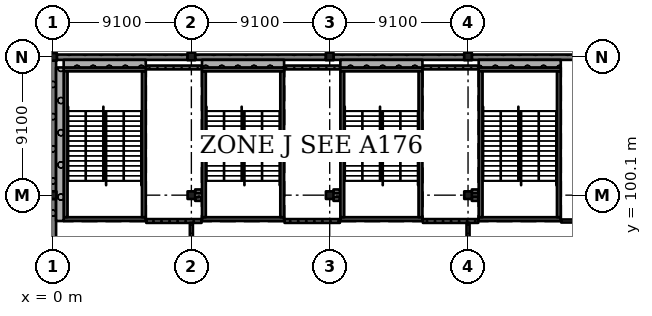
"""IFC4 building model, lengths in metres.
Left out: names, types, materials, properties, quantities, classifications, styles, units other than length and angle.
Written with IfcOpenShell. Run it as: python <this file> out.ifc"""

import sys

from ifc_helpers import new_model, si_unit, direction, frame, frame_2d, origin, origin_2d, place, context, subcontext, project, spatial, rectangle, extrude, element, fill, save


model = new_model("IFC4")
c1 = context("Model", 3, precision=1e-05, world=origin(), true_north=direction((0.0, 1.0)))
c2 = subcontext(c1, "Body", "Model", "MODEL_VIEW")
j1 = project(units=[si_unit("LENGTHUNIT", "METRE"), si_unit("PLANEANGLEUNIT", "RADIAN")], contexts=[c1])
p1 = place(None, origin())
s1 = spatial("IfcSite", under=j1, at=p1, CompositionType="ELEMENT")
p2 = place(p1, origin())
s2 = spatial("IfcBuilding", under=s1, at=p2, CompositionType="ELEMENT")
p3 = place(p2, frame((0.0, 0.0, 24.57)))
s3 = spatial("IfcBuildingStorey", under=s2, at=p3, CompositionType="ELEMENT", Elevation=24.57)
for number, where, z_axis, x_axis in (
    (1, (-0.025, 100.1, 0.0), (0.0, 0.0, 1.0), (1.0, 0.0, 0.0)),
    (2, (0.0, 109.2, 0.0), (0.0, 0.0, 1.0), (1.0, 0.0, 0.0)),
    (3, (9.1, 100.1, 0.0), (0.0, 0.0, 1.0), (1.0, 0.0, 0.0)),
    (4, (9.1, 109.225, 0.0), (0.0, 0.0, 1.0), (1.0, 0.0, 0.0)),
    (5, (18.2, 100.1, 0.0), (0.0, 0.0, 1.0), (1.0, 0.0, 0.0)),
    (6, (18.2, 109.225, 0.0), (0.0, 0.0, 1.0), (1.0, 0.0, 0.0)),
    (7, (27.3, 100.1, 0.0), (0.0, 0.0, 1.0), (1.0, 0.0, 0.0)),
    (8, (27.3, 109.225, 0.0), (0.0, 0.0, 1.0), (1.0, 0.0, 0.0)),
):
    element("IfcColumn", number, at=place(p3, frame(where, z_axis=z_axis, x_axis=x_axis)), inside=s3, PredefinedType="COLUMN", context=c2, shape_type="SweptSolid", body=[
        extrude(rectangle(XDim=0.5, YDim=0.5, at=origin_2d()), origin(), (0.0, 0.0, 1.0), 4.55),
    ])
p4 = place(p3, frame((6.1, 98.525, 0.0), z_axis=(0.0, 0.0, 1.0), x_axis=(-1.0, 0.0, 0.0)))
e9 = element("IfcWall", 9, at=p4, inside=s3, PredefinedType="SHEAR", context=c2, shape_type="SweptSolid", body=[
    extrude(rectangle(XDim=5.4, YDim=0.25, at=frame_2d((2.7, 0.0))), origin(), (0.0, 0.0, 1.0), 4.55),
])
p5 = place(p4, frame((1.5, 0.0, 0.0)))
e10 = element("IfcOpeningElement", 10, at=p5, cuts=e9, PredefinedType="OPENING", context=c2, shape_type="SweptSolid", body=[
    extrude(rectangle(XDim=2.4, YDim=2.1, at=frame_2d((1.2, 1.05))), frame((0.0, 0.135, 0.0), z_axis=(0.0, -1.0, 0.0), x_axis=(1.0, 0.0, 0.0)), (0.0, 0.0, 1.0), 0.27),
])
p6 = place(p3, frame((6.1, 108.375, 0.0), z_axis=(0.0, 0.0, 1.0), x_axis=(-1.0, 0.0, 0.0)))
e11 = element("IfcWall", 11, at=p6, inside=s3, PredefinedType="SHEAR", context=c2, shape_type="SweptSolid", body=[
    extrude(rectangle(XDim=5.4, YDim=0.25, at=frame_2d((2.7, 0.0))), origin(), (0.0, 0.0, 1.0), 4.55),
])
for number, where, z_axis, x_axis in (
    (12, (0.825, 108.25, 0.0), (0.0, 0.0, 1.0), (0.0, -1.0, 0.0)),
    (13, (5.975, 108.25, 0.0), (0.0, 0.0, 1.0), (0.0, -1.0, 0.0)),
):
    element("IfcWall", number, at=place(p3, frame(where, z_axis=z_axis, x_axis=x_axis)), inside=s3, PredefinedType="SHEAR", context=c2, shape_type="SweptSolid", body=[
        extrude(rectangle(XDim=9.6, YDim=0.25, at=frame_2d((4.8, 0.0))), origin(), (0.0, 0.0, 1.0), 4.55),
    ])
p7 = place(p3, frame((15.2, 98.525, 0.0), z_axis=(0.0, 0.0, 1.0), x_axis=(-1.0, 0.0, 0.0)))
e14 = element("IfcWall", 14, at=p7, inside=s3, PredefinedType="SHEAR", context=c2, shape_type="SweptSolid", body=[
    extrude(rectangle(XDim=5.4, YDim=0.25, at=frame_2d((2.7, 0.0))), origin(), (0.0, 0.0, 1.0), 4.55),
])
p8 = place(p7, frame((1.5, 0.0, 0.0)))
e15 = element("IfcOpeningElement", 15, at=p8, cuts=e14, PredefinedType="OPENING", context=c2, shape_type="SweptSolid", body=[
    extrude(rectangle(XDim=2.4, YDim=2.1, at=frame_2d((1.2, 1.05))), frame((0.0, 0.135, 0.0), z_axis=(0.0, -1.0, 0.0), x_axis=(1.0, 0.0, 0.0)), (0.0, 0.0, 1.0), 0.27),
])
p9 = place(p3, frame((15.2, 108.375, 0.0), z_axis=(0.0, 0.0, 1.0), x_axis=(-1.0, 0.0, 0.0)))
e16 = element("IfcWall", 16, at=p9, inside=s3, PredefinedType="SHEAR", context=c2, shape_type="SweptSolid", body=[
    extrude(rectangle(XDim=5.4, YDim=0.25, at=frame_2d((2.7, 0.0))), origin(), (0.0, 0.0, 1.0), 4.55),
])
for number, where, z_axis, x_axis in (
    (17, (9.925, 108.25, 0.0), (0.0, 0.0, 1.0), (0.0, -1.0, 0.0)),
    (18, (15.075, 108.25, 0.0), (0.0, 0.0, 1.0), (0.0, -1.0, 0.0)),
):
    element("IfcWall", number, at=place(p3, frame(where, z_axis=z_axis, x_axis=x_axis)), inside=s3, PredefinedType="SHEAR", context=c2, shape_type="SweptSolid", body=[
        extrude(rectangle(XDim=9.6, YDim=0.25, at=frame_2d((4.8, 0.0))), origin(), (0.0, 0.0, 1.0), 4.55),
    ])
p10 = place(p3, frame((24.3, 98.525, 0.0), z_axis=(0.0, 0.0, 1.0), x_axis=(-1.0, 0.0, 0.0)))
e19 = element("IfcWall", 19, at=p10, inside=s3, PredefinedType="SHEAR", context=c2, shape_type="SweptSolid", body=[
    extrude(rectangle(XDim=5.4, YDim=0.25, at=frame_2d((2.7, 0.0))), origin(), (0.0, 0.0, 1.0), 4.55),
])
p11 = place(p10, frame((1.5, 0.0, 0.0)))
e20 = element("IfcOpeningElement", 20, at=p11, cuts=e19, PredefinedType="OPENING", context=c2, shape_type="SweptSolid", body=[
    extrude(rectangle(XDim=2.4, YDim=2.1, at=frame_2d((1.2, 1.05))), frame((0.0, 0.135, 0.0), z_axis=(0.0, -1.0, 0.0), x_axis=(1.0, 0.0, 0.0)), (0.0, 0.0, 1.0), 0.27),
])
p12 = place(p3, frame((24.3, 108.375, 0.0), z_axis=(0.0, 0.0, 1.0), x_axis=(-1.0, 0.0, 0.0)))
e21 = element("IfcWall", 21, at=p12, inside=s3, PredefinedType="SHEAR", context=c2, shape_type="SweptSolid", body=[
    extrude(rectangle(XDim=5.4, YDim=0.25, at=frame_2d((2.7, 0.0))), origin(), (0.0, 0.0, 1.0), 4.55),
])
for number, where, z_axis, x_axis in (
    (22, (19.025, 108.25, 0.0), (0.0, 0.0, 1.0), (0.0, -1.0, 0.0)),
    (23, (24.175, 108.25, 0.0), (0.0, 0.0, 1.0), (0.0, -1.0, 0.0)),
):
    element("IfcWall", number, at=place(p3, frame(where, z_axis=z_axis, x_axis=x_axis)), inside=s3, PredefinedType="SHEAR", context=c2, shape_type="SweptSolid", body=[
        extrude(rectangle(XDim=9.6, YDim=0.25, at=frame_2d((4.8, 0.0))), origin(), (0.0, 0.0, 1.0), 4.55),
    ])
p13 = place(p3, frame((33.4, 98.525, 0.0), z_axis=(0.0, 0.0, 1.0), x_axis=(-1.0, 0.0, 0.0)))
e24 = element("IfcWall", 24, at=p13, inside=s3, PredefinedType="SHEAR", context=c2, shape_type="SweptSolid", body=[
    extrude(rectangle(XDim=5.4, YDim=0.25, at=frame_2d((2.7, 0.0))), origin(), (0.0, 0.0, 1.0), 4.55),
])
p14 = place(p13, frame((1.5, 0.0, 0.0)))
e25 = element("IfcOpeningElement", 25, at=p14, cuts=e24, PredefinedType="OPENING", context=c2, shape_type="SweptSolid", body=[
    extrude(rectangle(XDim=2.4, YDim=2.1, at=frame_2d((1.2, 1.05))), frame((0.0, 0.135, 0.0), z_axis=(0.0, -1.0, 0.0), x_axis=(1.0, 0.0, 0.0)), (0.0, 0.0, 1.0), 0.27),
])
p15 = place(p3, frame((33.4, 108.375, 0.0), z_axis=(0.0, 0.0, 1.0), x_axis=(-1.0, 0.0, 0.0)))
e26 = element("IfcWall", 26, at=p15, inside=s3, PredefinedType="SHEAR", context=c2, shape_type="SweptSolid", body=[
    extrude(rectangle(XDim=5.4, YDim=0.25, at=frame_2d((2.7, 0.0))), origin(), (0.0, 0.0, 1.0), 4.55),
])
for number, where, z_axis, x_axis in (
    (27, (28.125, 108.25, 0.0), (0.0, 0.0, 1.0), (0.0, -1.0, 0.0)),
    (28, (33.275, 108.25, 0.0), (0.0, 0.0, 1.0), (0.0, -1.0, 0.0)),
):
    element("IfcWall", number, at=place(p3, frame(where, z_axis=z_axis, x_axis=x_axis)), inside=s3, PredefinedType="SHEAR", context=c2, shape_type="SweptSolid", body=[
        extrude(rectangle(XDim=9.6, YDim=0.25, at=frame_2d((4.8, 0.0))), origin(), (0.0, 0.0, 1.0), 4.55),
    ])
p16 = place(p3, frame((36.15, 109.175, 0.0), z_axis=(0.0, 0.0, 1.0), x_axis=(-1.0, 0.0, 0.0)))
e29 = element("IfcWall", 29, at=p16, inside=s3, PredefinedType="SOLIDWALL", context=c2, shape_type="SweptSolid", body=[
    extrude(rectangle(XDim=8.6, YDim=0.35, at=frame_2d((4.3, 0.0))), origin(), (0.0, 0.0, 1.0), 3.6),
])
p17 = place(p3, frame((27.05, 109.175, 0.0), z_axis=(0.0, 0.0, 1.0), x_axis=(-1.0, 0.0, 0.0)))
e30 = element("IfcWall", 30, at=p17, inside=s3, PredefinedType="SOLIDWALL", context=c2, shape_type="SweptSolid", body=[
    extrude(rectangle(XDim=8.6, YDim=0.35, at=frame_2d((4.3, 0.0))), origin(), (0.0, 0.0, 1.0), 3.6),
])
p18 = place(p3, frame((17.95, 109.175, 0.0), z_axis=(0.0, 0.0, 1.0), x_axis=(-1.0, 0.0, 0.0)))
e31 = element("IfcWall", 31, at=p18, inside=s3, PredefinedType="SOLIDWALL", context=c2, shape_type="SweptSolid", body=[
    extrude(rectangle(XDim=8.6, YDim=0.35, at=frame_2d((4.3, 0.0))), origin(), (0.0, 0.0, 1.0), 3.6),
])
p19 = place(p3, frame((8.85, 109.175, 0.0), z_axis=(0.0, 0.0, 1.0), x_axis=(-1.0, 0.0, 0.0)))
e32 = element("IfcWall", 32, at=p19, inside=s3, PredefinedType="SOLIDWALL", context=c2, shape_type="SweptSolid", body=[
    extrude(rectangle(XDim=8.6, YDim=0.35, at=frame_2d((4.3, 0.0))), origin(), (0.0, 0.0, 1.0), 3.6),
])
p20 = place(p3, frame((0.025, 108.95, 0.0), z_axis=(0.0, 0.0, 1.0), x_axis=(0.0, -1.0, 0.0)))
e33 = element("IfcWall", 33, at=p20, inside=s3, PredefinedType="SOLIDWALL", context=c2, shape_type="SweptSolid", body=[
    extrude(rectangle(XDim=8.6, YDim=0.35, at=frame_2d((4.3, 0.0))), origin(), (0.0, 0.0, 1.0), 3.6),
])
p21 = place(p3, frame((0.025, 99.85, 0.0), z_axis=(0.0, 0.0, 1.0), x_axis=(0.0, -1.0, 0.0)))
e34 = element("IfcWall", 34, at=p21, inside=s3, PredefinedType="SOLIDWALL", context=c2, shape_type="SweptSolid", body=[
    extrude(rectangle(XDim=8.6, YDim=0.35, at=frame_2d((4.3, 0.0))), origin(), (0.0, 0.0, 1.0), 3.6),
])
p22 = place(p3, frame((0.7, 108.75, 0.0), z_axis=(0.0, 0.0, 1.0), x_axis=(1.0, 0.0, 0.0)))
e35 = element("IfcWall", 35, at=p22, inside=s3, PredefinedType="SOLIDWALL", context=c2, shape_type="SweptSolid", body=[
    extrude(rectangle(XDim=5.4, YDim=0.5, at=frame_2d((2.7, 0.0))), origin(), (0.0, 0.0, 1.0), 4.35),
])
p23 = place(p3, frame((0.45, 98.4, 0.0), z_axis=(0.0, 0.0, 1.0), x_axis=(0.0, 1.0, 0.0)))
e36 = element("IfcWall", 36, at=p23, inside=s3, PredefinedType="SOLIDWALL", context=c2, shape_type="SweptSolid", body=[
    extrude(rectangle(XDim=10.1, YDim=0.5, at=frame_2d((5.05, 0.0))), origin(), (0.0, 0.0, 1.0), 4.35),
])
p24 = place(p3, frame((9.8, 108.75, 0.0), z_axis=(0.0, 0.0, 1.0), x_axis=(1.0, 0.0, 0.0)))
e37 = element("IfcWall", 37, at=p24, inside=s3, PredefinedType="SOLIDWALL", context=c2, shape_type="SweptSolid", body=[
    extrude(rectangle(XDim=5.4, YDim=0.5, at=frame_2d((2.7, 0.0))), origin(), (0.0, 0.0, 1.0), 4.35),
])
p25 = place(p3, frame((18.9, 108.75, 0.0), z_axis=(0.0, 0.0, 1.0), x_axis=(1.0, 0.0, 0.0)))
e38 = element("IfcWall", 38, at=p25, inside=s3, PredefinedType="SOLIDWALL", context=c2, shape_type="SweptSolid", body=[
    extrude(rectangle(XDim=5.4, YDim=0.5, at=frame_2d((2.7, 0.0))), origin(), (0.0, 0.0, 1.0), 4.35),
])
p26 = place(p3, frame((28.0, 108.75, 0.0), z_axis=(0.0, 0.0, 1.0), x_axis=(1.0, 0.0, 0.0)))
e39 = element("IfcWall", 39, at=p26, inside=s3, PredefinedType="SOLIDWALL", context=c2, shape_type="SweptSolid", body=[
    extrude(rectangle(XDim=5.4, YDim=0.5, at=frame_2d((2.7, 0.0))), origin(), (0.0, 0.0, 1.0), 4.35),
])
p27 = place(p3, frame((6.13, 98.4, 0.0), z_axis=(0.0, 0.0, 1.0), x_axis=(1.0, 0.0, 0.0)))
e40 = element("IfcWall", 40, at=p27, inside=s3, PredefinedType="SOLIDWALL", context=c2, shape_type="SweptSolid", body=[
    extrude(rectangle(XDim=3.64, YDim=0.25, at=frame_2d((1.82, 0.0))), origin(), (0.0, 0.0, 1.0), 4.35),
])
p28 = place(p27, frame((0.95, 0.0, 0.0)))
e41 = element("IfcOpeningElement", 41, at=p28, cuts=e40, PredefinedType="OPENING", context=c2, shape_type="SweptSolid", body=[
    extrude(rectangle(XDim=1.0, YDim=2.1, at=frame_2d((0.5, 1.05))), frame((0.0, 0.135, 0.0), z_axis=(0.0, -1.0, 0.0), x_axis=(1.0, 0.0, 0.0)), (0.0, 0.0, 1.0), 0.27),
])
p29 = place(p3, frame((6.13, 108.5, 0.0), z_axis=(0.0, 0.0, 1.0), x_axis=(1.0, 0.0, 0.0)))
e42 = element("IfcWall", 42, at=p29, inside=s3, PredefinedType="SOLIDWALL", context=c2, shape_type="SweptSolid", body=[
    extrude(rectangle(XDim=3.64, YDim=0.25, at=frame_2d((1.82, 0.0))), origin(), (0.0, 0.0, 1.0), 4.35),
])
p30 = place(p3, frame((9.1, 98.275, 0.0), z_axis=(0.0, 0.0, 1.0), x_axis=(0.0, -1.0, 0.0)))
e43 = element("IfcWall", 43, at=p30, inside=s3, PredefinedType="PARTITIONING", context=c2, shape_type="SweptSolid", body=[
    extrude(rectangle(XDim=7.025, YDim=0.2, at=frame_2d((3.512, 0.0))), origin(), (0.0, 0.0, 1.0), 3.6),
])
p31 = place(p30, frame((0.85, 0.0, 0.0)))
e44 = element("IfcOpeningElement", 44, at=p31, cuts=e43, PredefinedType="OPENING", context=c2, shape_type="SweptSolid", body=[
    extrude(rectangle(XDim=1.8, YDim=2.4, at=frame_2d((0.9, 1.2))), frame((0.0, 0.11, 0.0), z_axis=(0.0, -1.0, 0.0), x_axis=(1.0, 0.0, 0.0)), (0.0, 0.0, 1.0), 0.22),
])
p32 = place(p30, frame((4.35, 0.0, 0.0)))
e45 = element("IfcOpeningElement", 45, at=p32, cuts=e43, PredefinedType="OPENING", context=c2, shape_type="SweptSolid", body=[
    extrude(rectangle(XDim=1.8, YDim=2.4, at=frame_2d((0.9, 1.2))), frame((0.0, 0.11, 0.0), z_axis=(0.0, -1.0, 0.0), x_axis=(1.0, 0.0, 0.0)), (0.0, 0.0, 1.0), 0.22),
])
for number, where, z_axis, x_axis in (
    (46, (9.35, 99.85, 0.0), (0.0, 0.0, 1.0), (1.0, 0.0, 0.0)),
    (47, (9.77, 100.35, 0.0), (0.0, 0.0, 1.0), (-1.0, 0.0, 0.0)),
):
    element("IfcWall", number, at=place(p3, frame(where, z_axis=z_axis, x_axis=x_axis)), inside=s3, PredefinedType="SOLIDWALL", context=c2, shape_type="SweptSolid", body=[
        extrude(rectangle(XDim=0.42, YDim=0.25, at=frame_2d((0.21, 0.0))), origin(), (0.0, 0.0, 1.0), 4.35),
    ])
p33 = place(p3, frame((15.23, 98.4, 0.0), z_axis=(0.0, 0.0, 1.0), x_axis=(1.0, 0.0, 0.0)))
e48 = element("IfcWall", 48, at=p33, inside=s3, PredefinedType="SOLIDWALL", context=c2, shape_type="SweptSolid", body=[
    extrude(rectangle(XDim=3.64, YDim=0.25, at=frame_2d((1.82, 0.0))), origin(), (0.0, 0.0, 1.0), 4.35),
])
p34 = place(p33, frame((1.45, 0.0, 0.0)))
e49 = element("IfcOpeningElement", 49, at=p34, cuts=e48, PredefinedType="OPENING", context=c2, shape_type="SweptSolid", body=[
    extrude(rectangle(XDim=0.8, YDim=2.1, at=frame_2d((0.4, 1.05))), frame((0.0, 0.135, 0.0), z_axis=(0.0, -1.0, 0.0), x_axis=(1.0, 0.0, 0.0)), (0.0, 0.0, 1.0), 0.27),
])
p35 = place(p3, frame((15.23, 108.5, 0.0), z_axis=(0.0, 0.0, 1.0), x_axis=(1.0, 0.0, 0.0)))
e50 = element("IfcWall", 50, at=p35, inside=s3, PredefinedType="SOLIDWALL", context=c2, shape_type="SweptSolid", body=[
    extrude(rectangle(XDim=3.64, YDim=0.25, at=frame_2d((1.82, 0.0))), origin(), (0.0, 0.0, 1.0), 4.35),
])
for number, where, z_axis, x_axis in (
    (51, (18.45, 99.85, 0.0), (0.0, 0.0, 1.0), (1.0, 0.0, 0.0)),
    (52, (18.87, 100.35, 0.0), (0.0, 0.0, 1.0), (-1.0, 0.0, 0.0)),
):
    element("IfcWall", number, at=place(p3, frame(where, z_axis=z_axis, x_axis=x_axis)), inside=s3, PredefinedType="SOLIDWALL", context=c2, shape_type="SweptSolid", body=[
        extrude(rectangle(XDim=0.42, YDim=0.25, at=frame_2d((0.21, 0.0))), origin(), (0.0, 0.0, 1.0), 4.35),
    ])
p36 = place(p3, frame((24.33, 98.4, 0.0), z_axis=(0.0, 0.0, 1.0), x_axis=(1.0, 0.0, 0.0)))
e53 = element("IfcWall", 53, at=p36, inside=s3, PredefinedType="SOLIDWALL", context=c2, shape_type="SweptSolid", body=[
    extrude(rectangle(XDim=3.64, YDim=0.25, at=frame_2d((1.82, 0.0))), origin(), (0.0, 0.0, 1.0), 4.35),
])
p37 = place(p36, frame((0.95, 0.0, 0.0)))
e54 = element("IfcOpeningElement", 54, at=p37, cuts=e53, PredefinedType="OPENING", context=c2, shape_type="SweptSolid", body=[
    extrude(rectangle(XDim=1.0, YDim=2.1, at=frame_2d((0.5, 1.05))), frame((0.0, 0.135, 0.0), z_axis=(0.0, -1.0, 0.0), x_axis=(1.0, 0.0, 0.0)), (0.0, 0.0, 1.0), 0.27),
])
p38 = place(p3, frame((24.33, 108.5, 0.0), z_axis=(0.0, 0.0, 1.0), x_axis=(1.0, 0.0, 0.0)))
e55 = element("IfcWall", 55, at=p38, inside=s3, PredefinedType="SOLIDWALL", context=c2, shape_type="SweptSolid", body=[
    extrude(rectangle(XDim=3.64, YDim=0.25, at=frame_2d((1.82, 0.0))), origin(), (0.0, 0.0, 1.0), 4.35),
])
p39 = place(p3, frame((27.3, 98.275, 0.0), z_axis=(0.0, 0.0, 1.0), x_axis=(0.0, -1.0, 0.0)))
e56 = element("IfcWall", 56, at=p39, inside=s3, PredefinedType="PARTITIONING", context=c2, shape_type="SweptSolid", body=[
    extrude(rectangle(XDim=7.025, YDim=0.2, at=frame_2d((3.512, 0.0))), origin(), (0.0, 0.0, 1.0), 3.6),
])
p40 = place(p39, frame((0.85, 0.0, 0.0)))
e57 = element("IfcOpeningElement", 57, at=p40, cuts=e56, PredefinedType="OPENING", context=c2, shape_type="SweptSolid", body=[
    extrude(rectangle(XDim=1.8, YDim=2.4, at=frame_2d((0.9, 1.2))), frame((0.0, 0.11, 0.0), z_axis=(0.0, -1.0, 0.0), x_axis=(1.0, 0.0, 0.0)), (0.0, 0.0, 1.0), 0.22),
])
p41 = place(p39, frame((4.35, 0.0, 0.0)))
e58 = element("IfcOpeningElement", 58, at=p41, cuts=e56, PredefinedType="OPENING", context=c2, shape_type="SweptSolid", body=[
    extrude(rectangle(XDim=1.8, YDim=2.4, at=frame_2d((0.9, 1.2))), frame((0.0, 0.11, 0.0), z_axis=(0.0, -1.0, 0.0), x_axis=(1.0, 0.0, 0.0)), (0.0, 0.0, 1.0), 0.22),
])
for number, where, z_axis, x_axis in (
    (59, (27.55, 99.85, 0.0), (0.0, 0.0, 1.0), (1.0, 0.0, 0.0)),
    (60, (27.97, 100.35, 0.0), (0.0, 0.0, 1.0), (-1.0, 0.0, 0.0)),
):
    element("IfcWall", number, at=place(p3, frame(where, z_axis=z_axis, x_axis=x_axis)), inside=s3, PredefinedType="SOLIDWALL", context=c2, shape_type="SweptSolid", body=[
        extrude(rectangle(XDim=0.42, YDim=0.25, at=frame_2d((0.21, 0.0))), origin(), (0.0, 0.0, 1.0), 4.35),
    ])
p42 = place(p3, frame((33.43, 98.4, 0.0), z_axis=(0.0, 0.0, 1.0), x_axis=(1.0, 0.0, 0.0)))
e61 = element("IfcWall", 61, at=p42, inside=s3, PredefinedType="PARTITIONING", context=c2, shape_type="SweptSolid", body=[
    extrude(rectangle(XDim=2.82, YDim=0.2, at=frame_2d((1.41, 0.0))), origin(), (0.0, 0.0, 1.0), 4.35),
])
p43 = place(p42, frame((0.55, 0.0, 0.0)))
e62 = element("IfcOpeningElement", 62, at=p43, cuts=e61, PredefinedType="OPENING", context=c2, shape_type="SweptSolid", body=[
    extrude(rectangle(XDim=1.8, YDim=2.4, at=frame_2d((0.9, 1.2))), frame((0.0, 0.11, 0.0), z_axis=(0.0, -1.0, 0.0), x_axis=(1.0, 0.0, 0.0)), (0.0, 0.0, 1.0), 0.22),
])
p44 = place(p28, origin())
e63 = element("IfcDoor", 63, at=p44, inside=s3, OperationType="SINGLE_SWING_RIGHT", PredefinedType="DOOR", context=c2, shape_type="SweptSolid", body=[
    extrude(rectangle(XDim=1.0, YDim=2.1, at=frame_2d((0.5, 1.05))), frame((0.0, 0.025, 0.0), z_axis=(0.0, -1.0, 0.0), x_axis=(1.0, 0.0, 0.0)), (0.0, 0.0, 1.0), 0.05),
])
fill(e41, e63)
p45 = place(p34, origin())
e64 = element("IfcDoor", 64, at=p45, inside=s3, OperationType="SINGLE_SWING_LEFT", PredefinedType="DOOR", context=c2, shape_type="SweptSolid", body=[
    extrude(rectangle(XDim=0.8, YDim=2.1, at=frame_2d((0.4, 1.05))), frame((0.0, 0.025, 0.0), z_axis=(0.0, -1.0, 0.0), x_axis=(1.0, 0.0, 0.0)), (0.0, 0.0, 1.0), 0.05),
])
fill(e49, e64)
p46 = place(p37, origin())
e65 = element("IfcDoor", 65, at=p46, inside=s3, OperationType="SINGLE_SWING_RIGHT", PredefinedType="DOOR", context=c2, shape_type="SweptSolid", body=[
    extrude(rectangle(XDim=1.0, YDim=2.1, at=frame_2d((0.5, 1.05))), frame((0.0, 0.025, 0.0), z_axis=(0.0, -1.0, 0.0), x_axis=(1.0, 0.0, 0.0)), (0.0, 0.0, 1.0), 0.05),
])
fill(e54, e65)
p47 = place(p31, origin())
e66 = element("IfcDoor", 66, at=p47, inside=s3, OperationType="DOUBLE_DOOR_SINGLE_SWING", PredefinedType="DOOR", context=c2, shape_type="SweptSolid", body=[
    extrude(rectangle(XDim=1.8, YDim=2.4, at=frame_2d((0.9, 1.2))), frame((0.0, 0.025, 0.0), z_axis=(0.0, -1.0, 0.0), x_axis=(1.0, 0.0, 0.0)), (0.0, 0.0, 1.0), 0.05),
])
fill(e44, e66)
p48 = place(p40, origin())
e67 = element("IfcDoor", 67, at=p48, inside=s3, OperationType="DOUBLE_DOOR_SINGLE_SWING", PredefinedType="DOOR", context=c2, shape_type="SweptSolid", body=[
    extrude(rectangle(XDim=1.8, YDim=2.4, at=frame_2d((0.9, 1.2))), frame((0.0, 0.025, 0.0), z_axis=(0.0, -1.0, 0.0), x_axis=(1.0, 0.0, 0.0)), (0.0, 0.0, 1.0), 0.05),
])
fill(e57, e67)
p49 = place(p43, origin())
e68 = element("IfcDoor", 68, at=p49, inside=s3, OperationType="DOUBLE_DOOR_SINGLE_SWING", PredefinedType="DOOR", context=c2, shape_type="SweptSolid", body=[
    extrude(rectangle(XDim=1.8, YDim=2.4, at=frame_2d((0.9, 1.2))), frame((0.0, 0.025, 0.0), z_axis=(0.0, -1.0, 0.0), x_axis=(1.0, 0.0, 0.0)), (0.0, 0.0, 1.0), 0.05),
])
fill(e62, e68)
p50 = place(p5, origin())
e69 = element("IfcDoor", 69, at=p50, inside=s3, OperationType="DOUBLE_DOOR_SINGLE_SWING", PredefinedType="DOOR", context=c2, shape_type="SweptSolid", body=[
    extrude(rectangle(XDim=2.4, YDim=2.1, at=frame_2d((1.2, 1.05))), frame((0.0, 0.025, 0.0), z_axis=(0.0, -1.0, 0.0), x_axis=(1.0, 0.0, 0.0)), (0.0, 0.0, 1.0), 0.05),
])
fill(e10, e69)
p51 = place(p8, origin())
e70 = element("IfcDoor", 70, at=p51, inside=s3, OperationType="DOUBLE_DOOR_SINGLE_SWING", PredefinedType="DOOR", context=c2, shape_type="SweptSolid", body=[
    extrude(rectangle(XDim=2.4, YDim=2.1, at=frame_2d((1.2, 1.05))), frame((0.0, 0.025, 0.0), z_axis=(0.0, -1.0, 0.0), x_axis=(1.0, 0.0, 0.0)), (0.0, 0.0, 1.0), 0.05),
])
fill(e15, e70)
p52 = place(p11, origin())
e71 = element("IfcDoor", 71, at=p52, inside=s3, OperationType="DOUBLE_DOOR_SINGLE_SWING", PredefinedType="DOOR", context=c2, shape_type="SweptSolid", body=[
    extrude(rectangle(XDim=2.4, YDim=2.1, at=frame_2d((1.2, 1.05))), frame((0.0, 0.025, 0.0), z_axis=(0.0, -1.0, 0.0), x_axis=(1.0, 0.0, 0.0)), (0.0, 0.0, 1.0), 0.05),
])
fill(e20, e71)
p53 = place(p14, origin())
e72 = element("IfcDoor", 72, at=p53, inside=s3, OperationType="DOUBLE_DOOR_SINGLE_SWING", PredefinedType="DOOR", context=c2, shape_type="SweptSolid", body=[
    extrude(rectangle(XDim=2.4, YDim=2.1, at=frame_2d((1.2, 1.05))), frame((0.0, 0.025, 0.0), z_axis=(0.0, -1.0, 0.0), x_axis=(1.0, 0.0, 0.0)), (0.0, 0.0, 1.0), 0.05),
])
fill(e25, e72)
save(model, sys.argv[1])
